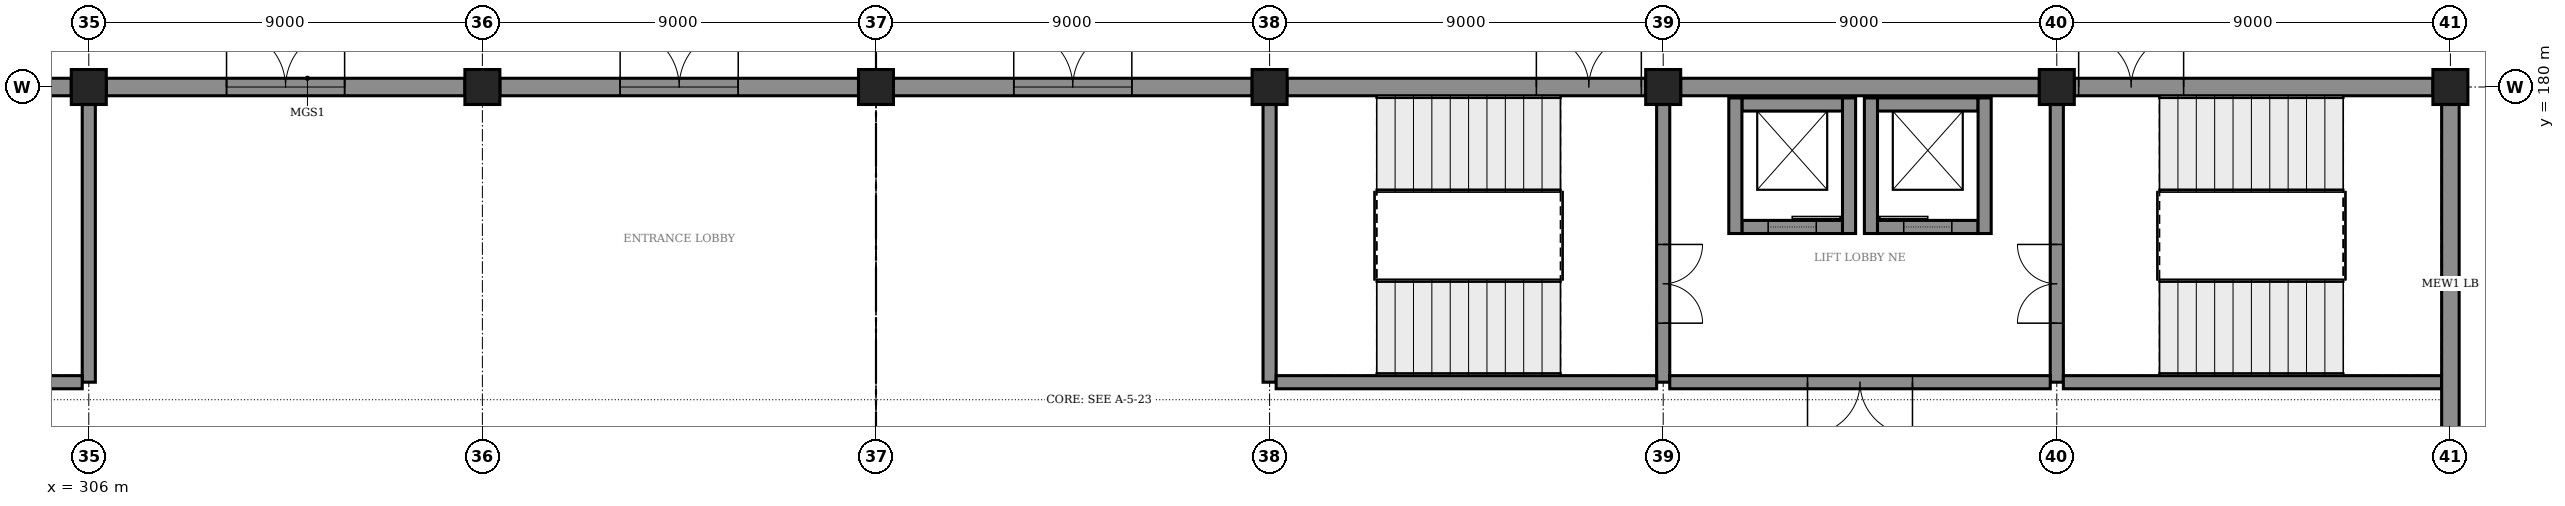
"""IFC4 building model, lengths in metres.
Left out: names, types, materials, properties, quantities, classifications, styles, units other than length and angle.
Written with IfcOpenShell. Run it as: python <this file> out.ifc"""

import sys

from ifc_helpers import new_model, si_unit, direction, frame, frame_2d, origin, origin_2d, place, context, subcontext, project, spatial, rectangle, extrude, element, fill, save


model = new_model("IFC4")
c1 = context("Model", 3, precision=1e-05, world=origin(), true_north=direction((0.0, 1.0)))
c2 = subcontext(c1, "Body", "Model", "MODEL_VIEW")
j1 = project(units=[si_unit("LENGTHUNIT", "METRE"), si_unit("PLANEANGLEUNIT", "RADIAN")], contexts=[c1])
p1 = place(None, origin())
s1 = spatial("IfcSite", under=j1, at=p1, CompositionType="ELEMENT")
p2 = place(p1, origin())
s2 = spatial("IfcBuilding", under=s1, at=p2, CompositionType="ELEMENT")
p3 = place(p2, origin())
s3 = spatial("IfcBuildingStorey", under=s2, at=p3, CompositionType="ELEMENT", Elevation=0.0)
for number, where, z_axis, x_axis in (
    (1, (306.0, 180.0, -0.3), (0.0, 0.0, 1.0), (1.0, 0.0, 0.0)),
    (2, (315.0, 180.0, -0.3), (0.0, 0.0, 1.0), (1.0, 0.0, 0.0)),
    (3, (324.0, 180.0, -0.3), (0.0, 0.0, 1.0), (1.0, 0.0, 0.0)),
    (4, (333.0, 180.0, -0.3), (0.0, 0.0, 1.0), (1.0, 0.0, 0.0)),
    (5, (342.0, 180.0, -0.3), (0.0, 0.0, 1.0), (1.0, 0.0, 0.0)),
    (6, (351.0, 180.0, -0.3), (0.0, 0.0, 1.0), (1.0, 0.0, 0.0)),
    (7, (360.0, 180.0, -0.3), (0.0, 0.0, 1.0), (1.0, 0.0, 0.0)),
):
    element("IfcColumn", number, at=place(p3, frame(where, z_axis=z_axis, x_axis=x_axis)), inside=s3, PredefinedType="COLUMN", context=c2, shape_type="SweptSolid", body=[
        extrude(rectangle(XDim=0.8, YDim=0.8, at=origin_2d()), origin(), (0.0, 0.0, 1.0), 6.3),
    ])
p4 = place(p3, frame((297.4, 180.0, 0.0), z_axis=(0.0, 0.0, 1.0), x_axis=(1.0, 0.0, 0.0)))
e8 = element("IfcWall", 8, at=p4, inside=s3, PredefinedType="STANDARD", context=c2, shape_type="SweptSolid", body=[
    extrude(rectangle(XDim=8.2, YDim=0.4, at=frame_2d((4.1, 0.0))), origin(), (0.0, 0.0, 1.0), 4.82),
])
p5 = place(p4, frame((0.1, 0.0, 0.0)))
e9 = element("IfcOpeningElement", 9, at=p5, cuts=e8, PredefinedType="OPENING", context=c2, shape_type="SweptSolid", body=[
    extrude(rectangle(XDim=2.4, YDim=2.4, at=frame_2d((1.2, 1.2))), frame((0.0, 0.21, 0.0), z_axis=(0.0, -1.0, 0.0), x_axis=(1.0, 0.0, 0.0)), (0.0, 0.0, 1.0), 0.42),
])
p6 = place(p3, frame((306.4, 180.0, 0.0), z_axis=(0.0, 0.0, 1.0), x_axis=(1.0, 0.0, 0.0)))
e10 = element("IfcWall", 10, at=p6, inside=s3, PredefinedType="STANDARD", context=c2, shape_type="SweptSolid", body=[
    extrude(rectangle(XDim=8.2, YDim=0.4, at=frame_2d((4.1, 0.0))), origin(), (0.0, 0.0, 1.0), 4.82),
])
p7 = place(p6, frame((2.75, 0.0, 0.0)))
e11 = element("IfcOpeningElement", 11, at=p7, cuts=e10, PredefinedType="OPENING", context=c2, shape_type="SweptSolid", body=[
    extrude(rectangle(XDim=2.7, YDim=2.4, at=frame_2d((1.35, 1.2))), frame((0.0, 0.21, 0.0), z_axis=(0.0, -1.0, 0.0), x_axis=(1.0, 0.0, 0.0)), (0.0, 0.0, 1.0), 0.42),
])
p8 = place(p6, frame((2.75, 0.0, 2.6)))
e12 = element("IfcOpeningElement", 12, at=p8, cuts=e10, PredefinedType="OPENING", context=c2, shape_type="SweptSolid", body=[
    extrude(rectangle(XDim=2.7, YDim=1.8, at=frame_2d((1.35, 0.9))), frame((0.0, 0.21, 0.0), z_axis=(0.0, -1.0, 0.0), x_axis=(1.0, 0.0, 0.0)), (0.0, 0.0, 1.0), 0.42),
])
p9 = place(p3, frame((315.4, 180.0, 0.0), z_axis=(0.0, 0.0, 1.0), x_axis=(1.0, 0.0, 0.0)))
e13 = element("IfcWall", 13, at=p9, inside=s3, PredefinedType="STANDARD", context=c2, shape_type="SweptSolid", body=[
    extrude(rectangle(XDim=8.2, YDim=0.4, at=frame_2d((4.1, 0.0))), origin(), (0.0, 0.0, 1.0), 4.82),
])
p10 = place(p9, frame((2.75, 0.0, 0.0)))
e14 = element("IfcOpeningElement", 14, at=p10, cuts=e13, PredefinedType="OPENING", context=c2, shape_type="SweptSolid", body=[
    extrude(rectangle(XDim=2.7, YDim=2.4, at=frame_2d((1.35, 1.2))), frame((0.0, 0.21, 0.0), z_axis=(0.0, -1.0, 0.0), x_axis=(1.0, 0.0, 0.0)), (0.0, 0.0, 1.0), 0.42),
])
p11 = place(p9, frame((2.75, 0.0, 2.6)))
e15 = element("IfcOpeningElement", 15, at=p11, cuts=e13, PredefinedType="OPENING", context=c2, shape_type="SweptSolid", body=[
    extrude(rectangle(XDim=2.7, YDim=1.8, at=frame_2d((1.35, 0.9))), frame((0.0, 0.21, 0.0), z_axis=(0.0, -1.0, 0.0), x_axis=(1.0, 0.0, 0.0)), (0.0, 0.0, 1.0), 0.42),
])
p12 = place(p3, frame((324.4, 180.0, 0.0), z_axis=(0.0, 0.0, 1.0), x_axis=(1.0, 0.0, 0.0)))
e16 = element("IfcWall", 16, at=p12, inside=s3, PredefinedType="STANDARD", context=c2, shape_type="SweptSolid", body=[
    extrude(rectangle(XDim=8.2, YDim=0.4, at=frame_2d((4.1, 0.0))), origin(), (0.0, 0.0, 1.0), 4.82),
])
p13 = place(p12, frame((2.75, 0.0, 0.0)))
e17 = element("IfcOpeningElement", 17, at=p13, cuts=e16, PredefinedType="OPENING", context=c2, shape_type="SweptSolid", body=[
    extrude(rectangle(XDim=2.7, YDim=2.4, at=frame_2d((1.35, 1.2))), frame((0.0, 0.21, 0.0), z_axis=(0.0, -1.0, 0.0), x_axis=(1.0, 0.0, 0.0)), (0.0, 0.0, 1.0), 0.42),
])
p14 = place(p12, frame((2.75, 0.0, 2.6)))
e18 = element("IfcOpeningElement", 18, at=p14, cuts=e16, PredefinedType="OPENING", context=c2, shape_type="SweptSolid", body=[
    extrude(rectangle(XDim=2.7, YDim=1.8, at=frame_2d((1.35, 0.9))), frame((0.0, 0.21, 0.0), z_axis=(0.0, -1.0, 0.0), x_axis=(1.0, 0.0, 0.0)), (0.0, 0.0, 1.0), 0.42),
])
p15 = place(p3, frame((333.4, 180.0, 0.0), z_axis=(0.0, 0.0, 1.0), x_axis=(1.0, 0.0, 0.0)))
e19 = element("IfcWall", 19, at=p15, inside=s3, PredefinedType="STANDARD", context=c2, shape_type="SweptSolid", body=[
    extrude(rectangle(XDim=8.2, YDim=0.4, at=frame_2d((4.1, 0.0))), origin(), (0.0, 0.0, 1.0), 4.82),
])
p16 = place(p15, frame((5.7, 0.0, 0.0)))
e20 = element("IfcOpeningElement", 20, at=p16, cuts=e19, PredefinedType="OPENING", context=c2, shape_type="SweptSolid", body=[
    extrude(rectangle(XDim=2.4, YDim=2.4, at=frame_2d((1.2, 1.2))), frame((0.0, 0.21, 0.0), z_axis=(0.0, -1.0, 0.0), x_axis=(1.0, 0.0, 0.0)), (0.0, 0.0, 1.0), 0.42),
])
p17 = place(p3, frame((342.4, 180.0, 0.0), z_axis=(0.0, 0.0, 1.0), x_axis=(1.0, 0.0, 0.0)))
e21 = element("IfcWall", 21, at=p17, inside=s3, PredefinedType="STANDARD", context=c2, shape_type="SweptSolid", body=[
    extrude(rectangle(XDim=8.2, YDim=0.4, at=frame_2d((4.1, 0.0))), origin(), (0.0, 0.0, 1.0), 4.82),
])
p18 = place(p3, frame((351.4, 180.0, 0.0), z_axis=(0.0, 0.0, 1.0), x_axis=(1.0, 0.0, 0.0)))
e22 = element("IfcWall", 22, at=p18, inside=s3, PredefinedType="STANDARD", context=c2, shape_type="SweptSolid", body=[
    extrude(rectangle(XDim=8.2, YDim=0.4, at=frame_2d((4.1, 0.0))), origin(), (0.0, 0.0, 1.0), 4.82),
])
p19 = place(p18, frame((0.1, 0.0, 0.0)))
e23 = element("IfcOpeningElement", 23, at=p19, cuts=e22, PredefinedType="OPENING", context=c2, shape_type="SweptSolid", body=[
    extrude(rectangle(XDim=2.4, YDim=2.4, at=frame_2d((1.2, 1.2))), frame((0.0, 0.21, 0.0), z_axis=(0.0, -1.0, 0.0), x_axis=(1.0, 0.0, 0.0)), (0.0, 0.0, 1.0), 0.42),
])
p20 = place(p3, frame((360.0, 171.4, 0.0), z_axis=(0.0, 0.0, 1.0), x_axis=(0.0, 1.0, 0.0)))
e24 = element("IfcWall", 24, at=p20, inside=s3, PredefinedType="STANDARD", context=c2, shape_type="SweptSolid", body=[
    extrude(rectangle(XDim=8.2, YDim=0.4, at=frame_2d((4.1, 0.0))), origin(), (0.0, 0.0, 1.0), 4.82),
])
p21 = place(p3, frame((306.0, 173.25, 0.0), z_axis=(0.0, 0.0, 1.0), x_axis=(0.0, 1.0, 0.0)))
e25 = element("IfcWall", 25, at=p21, inside=s3, PredefinedType="SHEAR", context=c2, shape_type="SweptSolid", body=[
    extrude(rectangle(XDim=6.35, YDim=0.3, at=frame_2d((3.175, 0.0))), origin(), (0.0, 0.0, 1.0), 5.72),
])
p22 = place(p3, frame((297.15, 173.25, 0.0), z_axis=(0.0, 0.0, 1.0), x_axis=(1.0, 0.0, 0.0)))
e26 = element("IfcWall", 26, at=p22, inside=s3, PredefinedType="SHEAR", context=c2, shape_type="SweptSolid", body=[
    extrude(rectangle(XDim=8.7, YDim=0.3, at=frame_2d((4.35, 0.0))), origin(), (0.0, 0.0, 1.0), 5.72),
])
p23 = place(p3, frame((351.0, 173.25, 0.0), z_axis=(0.0, 0.0, 1.0), x_axis=(0.0, 1.0, 0.0)))
e27 = element("IfcWall", 27, at=p23, inside=s3, PredefinedType="SHEAR", context=c2, shape_type="SweptSolid", body=[
    extrude(rectangle(XDim=6.35, YDim=0.3, at=frame_2d((3.175, 0.0))), origin(), (0.0, 0.0, 1.0), 5.72),
])
p24 = place(p23, frame((1.35, 0.0, 0.0)))
e28 = element("IfcOpeningElement", 28, at=p24, cuts=e27, PredefinedType="OPENING", context=c2, shape_type="SweptSolid", body=[
    extrude(rectangle(XDim=1.8, YDim=2.4, at=frame_2d((0.9, 1.2))), frame((0.0, 0.16, 0.0), z_axis=(0.0, -1.0, 0.0), x_axis=(1.0, 0.0, 0.0)), (0.0, 0.0, 1.0), 0.32),
])
p25 = place(p3, frame((342.0, 173.25, 0.0), z_axis=(0.0, 0.0, 1.0), x_axis=(0.0, 1.0, 0.0)))
e29 = element("IfcWall", 29, at=p25, inside=s3, PredefinedType="SHEAR", context=c2, shape_type="SweptSolid", body=[
    extrude(rectangle(XDim=6.35, YDim=0.3, at=frame_2d((3.175, 0.0))), origin(), (0.0, 0.0, 1.0), 5.72),
])
p26 = place(p25, frame((1.35, 0.0, 0.0)))
e30 = element("IfcOpeningElement", 30, at=p26, cuts=e29, PredefinedType="OPENING", context=c2, shape_type="SweptSolid", body=[
    extrude(rectangle(XDim=1.8, YDim=2.4, at=frame_2d((0.9, 1.2))), frame((0.0, 0.16, 0.0), z_axis=(0.0, -1.0, 0.0), x_axis=(1.0, 0.0, 0.0)), (0.0, 0.0, 1.0), 0.32),
])
p27 = place(p3, frame((333.0, 173.25, 0.0), z_axis=(0.0, 0.0, 1.0), x_axis=(0.0, 1.0, 0.0)))
e31 = element("IfcWall", 31, at=p27, inside=s3, PredefinedType="SHEAR", context=c2, shape_type="SweptSolid", body=[
    extrude(rectangle(XDim=6.35, YDim=0.3, at=frame_2d((3.175, 0.0))), origin(), (0.0, 0.0, 1.0), 5.72),
])
p28 = place(p3, frame((333.15, 173.25, 0.0), z_axis=(0.0, 0.0, 1.0), x_axis=(1.0, 0.0, 0.0)))
e32 = element("IfcWall", 32, at=p28, inside=s3, PredefinedType="SHEAR", context=c2, shape_type="SweptSolid", body=[
    extrude(rectangle(XDim=8.7, YDim=0.3, at=frame_2d((4.35, 0.0))), origin(), (0.0, 0.0, 1.0), 5.72),
])
p29 = place(p3, frame((342.15, 173.25, 0.0), z_axis=(0.0, 0.0, 1.0), x_axis=(1.0, 0.0, 0.0)))
e33 = element("IfcWall", 33, at=p29, inside=s3, PredefinedType="SHEAR", context=c2, shape_type="SweptSolid", body=[
    extrude(rectangle(XDim=8.7, YDim=0.3, at=frame_2d((4.35, 0.0))), origin(), (0.0, 0.0, 1.0), 5.72),
])
p30 = place(p29, frame((3.15, 0.0, 0.0)))
e34 = element("IfcOpeningElement", 34, at=p30, cuts=e33, PredefinedType="OPENING", context=c2, shape_type="SweptSolid", body=[
    extrude(rectangle(XDim=2.4, YDim=2.4, at=frame_2d((1.2, 1.2))), frame((0.0, 0.16, 0.0), z_axis=(0.0, -1.0, 0.0), x_axis=(1.0, 0.0, 0.0)), (0.0, 0.0, 1.0), 0.32),
])
p31 = place(p3, frame((351.15, 173.25, 0.0), z_axis=(0.0, 0.0, 1.0), x_axis=(1.0, 0.0, 0.0)))
e35 = element("IfcWall", 35, at=p31, inside=s3, PredefinedType="SHEAR", context=c2, shape_type="SweptSolid", body=[
    extrude(rectangle(XDim=8.65, YDim=0.3, at=frame_2d((4.325, 0.0))), origin(), (0.0, 0.0, 1.0), 5.72),
])
for number, where, z_axis, x_axis in (
    (36, (349.35, 176.65, -1.7), (0.0, 0.0, 1.0), (0.0, 1.0, 0.0)),
    (37, (346.75, 176.65, -1.7), (0.0, 0.0, 1.0), (0.0, 1.0, 0.0)),
):
    element("IfcWall", number, at=place(p3, frame(where, z_axis=z_axis, x_axis=x_axis)), inside=s3, PredefinedType="SHEAR", context=c2, shape_type="SweptSolid", body=[
        extrude(rectangle(XDim=3.1, YDim=0.3, at=frame_2d((1.55, 0.0))), origin(), (0.0, 0.0, 1.0), 7.7),
    ])
p32 = place(p3, frame((346.9, 179.6, -1.7), z_axis=(0.0, 0.0, 1.0), x_axis=(1.0, 0.0, 0.0)))
e38 = element("IfcWall", 38, at=p32, inside=s3, PredefinedType="SHEAR", context=c2, shape_type="SweptSolid", body=[
    extrude(rectangle(XDim=2.3, YDim=0.3, at=frame_2d((1.15, 0.0))), origin(), (0.0, 0.0, 1.0), 7.7),
])
p33 = place(p3, frame((346.9, 176.8, -1.7), z_axis=(0.0, 0.0, 1.0), x_axis=(1.0, 0.0, 0.0)))
e39 = element("IfcWall", 39, at=p33, inside=s3, PredefinedType="SHEAR", context=c2, shape_type="SweptSolid", body=[
    extrude(rectangle(XDim=2.3, YDim=0.3, at=frame_2d((1.15, 0.0))), origin(), (0.0, 0.0, 1.0), 7.7),
])
p34 = place(p33, frame((0.6, 0.0, 1.7)))
e40 = element("IfcOpeningElement", 40, at=p34, cuts=e39, PredefinedType="OPENING", context=c2, shape_type="SweptSolid", body=[
    extrude(rectangle(XDim=1.1, YDim=2.2, at=frame_2d((0.55, 1.1))), frame((0.0, 0.16, 0.0), z_axis=(0.0, -1.0, 0.0), x_axis=(1.0, 0.0, 0.0)), (0.0, 0.0, 1.0), 0.32),
])
for number, where, z_axis, x_axis in (
    (41, (346.25, 176.65, -1.7), (0.0, 0.0, 1.0), (0.0, 1.0, 0.0)),
    (42, (343.65, 176.65, -1.7), (0.0, 0.0, 1.0), (0.0, 1.0, 0.0)),
):
    element("IfcWall", number, at=place(p3, frame(where, z_axis=z_axis, x_axis=x_axis)), inside=s3, PredefinedType="SHEAR", context=c2, shape_type="SweptSolid", body=[
        extrude(rectangle(XDim=3.1, YDim=0.3, at=frame_2d((1.55, 0.0))), origin(), (0.0, 0.0, 1.0), 7.7),
    ])
p35 = place(p3, frame((343.8, 179.6, -1.7), z_axis=(0.0, 0.0, 1.0), x_axis=(1.0, 0.0, 0.0)))
e43 = element("IfcWall", 43, at=p35, inside=s3, PredefinedType="SHEAR", context=c2, shape_type="SweptSolid", body=[
    extrude(rectangle(XDim=2.3, YDim=0.3, at=frame_2d((1.15, 0.0))), origin(), (0.0, 0.0, 1.0), 7.7),
])
p36 = place(p3, frame((343.8, 176.8, -1.7), z_axis=(0.0, 0.0, 1.0), x_axis=(1.0, 0.0, 0.0)))
e44 = element("IfcWall", 44, at=p36, inside=s3, PredefinedType="SHEAR", context=c2, shape_type="SweptSolid", body=[
    extrude(rectangle(XDim=2.3, YDim=0.3, at=frame_2d((1.15, 0.0))), origin(), (0.0, 0.0, 1.0), 7.7),
])
p37 = place(p36, frame((0.6, 0.0, 1.7)))
e45 = element("IfcOpeningElement", 45, at=p37, cuts=e44, PredefinedType="OPENING", context=c2, shape_type="SweptSolid", body=[
    extrude(rectangle(XDim=1.1, YDim=2.2, at=frame_2d((0.55, 1.1))), frame((0.0, 0.16, 0.0), z_axis=(0.0, -1.0, 0.0), x_axis=(1.0, 0.0, 0.0)), (0.0, 0.0, 1.0), 0.32),
])
p38 = place(p7, origin())
e46 = element("IfcDoor", 46, at=p38, inside=s3, OperationType="DOUBLE_DOOR_SINGLE_SWING", PredefinedType="DOOR", context=c2, shape_type="SweptSolid", body=[
    extrude(rectangle(XDim=2.7, YDim=2.4, at=frame_2d((1.35, 1.2))), frame((0.0, 0.025, 0.0), z_axis=(0.0, -1.0, 0.0), x_axis=(1.0, 0.0, 0.0)), (0.0, 0.0, 1.0), 0.05),
])
fill(e11, e46)
p39 = place(p8, origin())
e47 = element("IfcWindow", 47, at=p39, inside=s3, PartitioningType="TRIPLE_PANEL_VERTICAL", PredefinedType="WINDOW", context=c2, shape_type="SweptSolid", body=[
    extrude(rectangle(XDim=2.7, YDim=1.8, at=frame_2d((1.35, 0.9))), frame((0.0, 0.03, 0.0), z_axis=(0.0, -1.0, 0.0), x_axis=(1.0, 0.0, 0.0)), (0.0, 0.0, 1.0), 0.06),
])
fill(e12, e47)
p40 = place(p10, origin())
e48 = element("IfcDoor", 48, at=p40, inside=s3, OperationType="DOUBLE_DOOR_SINGLE_SWING", PredefinedType="DOOR", context=c2, shape_type="SweptSolid", body=[
    extrude(rectangle(XDim=2.7, YDim=2.4, at=frame_2d((1.35, 1.2))), frame((0.0, 0.025, 0.0), z_axis=(0.0, -1.0, 0.0), x_axis=(1.0, 0.0, 0.0)), (0.0, 0.0, 1.0), 0.05),
])
fill(e14, e48)
p41 = place(p11, origin())
e49 = element("IfcWindow", 49, at=p41, inside=s3, PartitioningType="TRIPLE_PANEL_VERTICAL", PredefinedType="WINDOW", context=c2, shape_type="SweptSolid", body=[
    extrude(rectangle(XDim=2.7, YDim=1.8, at=frame_2d((1.35, 0.9))), frame((0.0, 0.03, 0.0), z_axis=(0.0, -1.0, 0.0), x_axis=(1.0, 0.0, 0.0)), (0.0, 0.0, 1.0), 0.06),
])
fill(e15, e49)
p42 = place(p13, origin())
e50 = element("IfcDoor", 50, at=p42, inside=s3, OperationType="DOUBLE_DOOR_SINGLE_SWING", PredefinedType="DOOR", context=c2, shape_type="SweptSolid", body=[
    extrude(rectangle(XDim=2.7, YDim=2.4, at=frame_2d((1.35, 1.2))), frame((0.0, 0.025, 0.0), z_axis=(0.0, -1.0, 0.0), x_axis=(1.0, 0.0, 0.0)), (0.0, 0.0, 1.0), 0.05),
])
fill(e17, e50)
p43 = place(p14, origin())
e51 = element("IfcWindow", 51, at=p43, inside=s3, PartitioningType="TRIPLE_PANEL_VERTICAL", PredefinedType="WINDOW", context=c2, shape_type="SweptSolid", body=[
    extrude(rectangle(XDim=2.7, YDim=1.8, at=frame_2d((1.35, 0.9))), frame((0.0, 0.03, 0.0), z_axis=(0.0, -1.0, 0.0), x_axis=(1.0, 0.0, 0.0)), (0.0, 0.0, 1.0), 0.06),
])
fill(e18, e51)
p44 = place(p16, origin())
e52 = element("IfcDoor", 52, at=p44, inside=s3, OperationType="DOUBLE_DOOR_SINGLE_SWING", PredefinedType="DOOR", context=c2, shape_type="SweptSolid", body=[
    extrude(rectangle(XDim=2.4, YDim=2.4, at=frame_2d((1.2, 1.2))), frame((0.0, 0.025, 0.0), z_axis=(0.0, -1.0, 0.0), x_axis=(1.0, 0.0, 0.0)), (0.0, 0.0, 1.0), 0.05),
])
fill(e20, e52)
p45 = place(p19, origin())
e53 = element("IfcDoor", 53, at=p45, inside=s3, OperationType="DOUBLE_DOOR_SINGLE_SWING", PredefinedType="DOOR", context=c2, shape_type="SweptSolid", body=[
    extrude(rectangle(XDim=2.4, YDim=2.4, at=frame_2d((1.2, 1.2))), frame((0.0, 0.025, 0.0), z_axis=(0.0, -1.0, 0.0), x_axis=(1.0, 0.0, 0.0)), (0.0, 0.0, 1.0), 0.05),
])
fill(e23, e53)
p46 = place(p24, origin())
e54 = element("IfcDoor", 54, at=p46, inside=s3, OperationType="DOUBLE_DOOR_SINGLE_SWING", PredefinedType="DOOR", context=c2, shape_type="SweptSolid", body=[
    extrude(rectangle(XDim=1.8, YDim=2.4, at=frame_2d((0.9, 1.2))), frame((0.0, 0.025, 0.0), z_axis=(0.0, -1.0, 0.0), x_axis=(1.0, 0.0, 0.0)), (0.0, 0.0, 1.0), 0.05),
])
fill(e28, e54)
p47 = place(p26, frame((1.8, 0.0, 0.0), z_axis=(0.0, 0.0, 1.0), x_axis=(-1.0, 0.0, 0.0)))
e55 = element("IfcDoor", 55, at=p47, inside=s3, OperationType="DOUBLE_DOOR_SINGLE_SWING", PredefinedType="DOOR", context=c2, shape_type="SweptSolid", body=[
    extrude(rectangle(XDim=1.8, YDim=2.4, at=frame_2d((0.9, 1.2))), frame((0.0, 0.025, 0.0), z_axis=(0.0, -1.0, 0.0), x_axis=(1.0, 0.0, 0.0)), (0.0, 0.0, 1.0), 0.05),
])
fill(e30, e55)
p48 = place(p30, frame((2.4, 0.0, 0.0), z_axis=(0.0, 0.0, 1.0), x_axis=(-1.0, 0.0, 0.0)))
e56 = element("IfcDoor", 56, at=p48, inside=s3, OperationType="DOUBLE_DOOR_SINGLE_SWING", PredefinedType="DOOR", context=c2, shape_type="SweptSolid", body=[
    extrude(rectangle(XDim=2.4, YDim=2.4, at=frame_2d((1.2, 1.2))), frame((0.0, 0.025, 0.0), z_axis=(0.0, -1.0, 0.0), x_axis=(1.0, 0.0, 0.0)), (0.0, 0.0, 1.0), 0.05),
])
fill(e34, e56)
p49 = place(p34, origin())
e57 = element("IfcDoor", 57, at=p49, inside=s3, OperationType="SLIDING_TO_LEFT", PredefinedType="DOOR", context=c2, shape_type="SweptSolid", body=[
    extrude(rectangle(XDim=1.1, YDim=2.2, at=frame_2d((0.55, 1.1))), frame((0.0, 0.025, 0.0), z_axis=(0.0, -1.0, 0.0), x_axis=(1.0, 0.0, 0.0)), (0.0, 0.0, 1.0), 0.05),
])
fill(e40, e57)
p50 = place(p37, origin())
e58 = element("IfcDoor", 58, at=p50, inside=s3, OperationType="SLIDING_TO_RIGHT", PredefinedType="DOOR", context=c2, shape_type="SweptSolid", body=[
    extrude(rectangle(XDim=1.1, YDim=2.2, at=frame_2d((0.55, 1.1))), frame((0.0, 0.025, 0.0), z_axis=(0.0, -1.0, 0.0), x_axis=(1.0, 0.0, 0.0)), (0.0, 0.0, 1.0), 0.05),
])
fill(e45, e58)
save(model, sys.argv[1])
